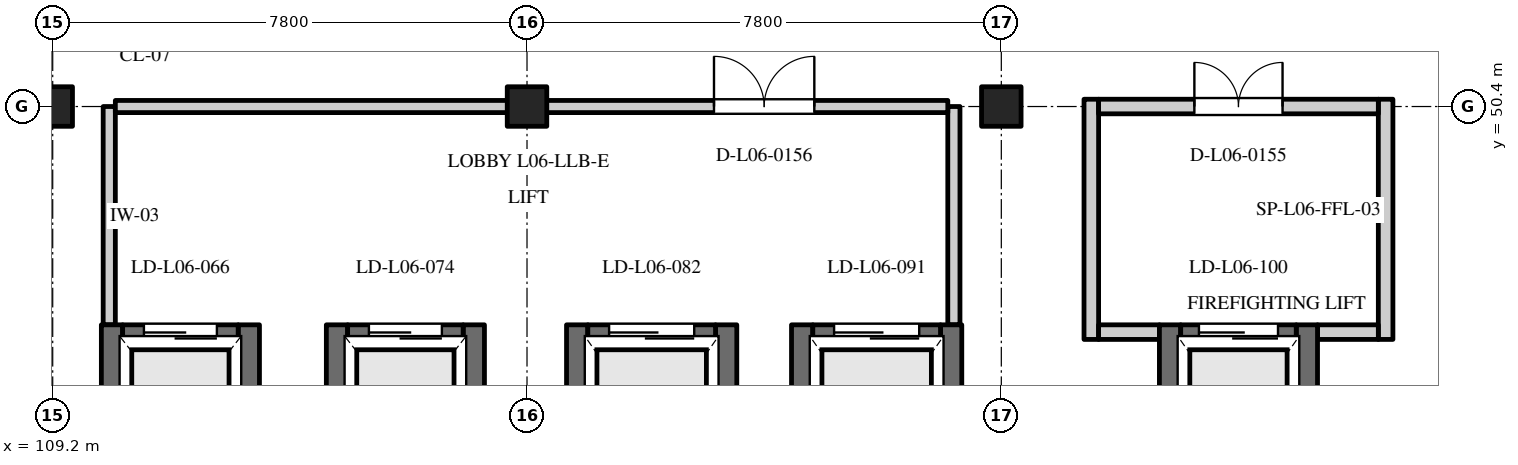
"""IFC4 building model, lengths in metres.
Left out: names, types, materials, properties, quantities, classifications, styles, units other than length and angle.
Written with IfcOpenShell. Run it as: python <this file> out.ifc"""

import sys

from ifc_helpers import new_model, si_unit, direction, frame, frame_2d, origin, origin_2d, place, context, subcontext, project, spatial, rectangle, extrude, element, fill, save


model = new_model("IFC4")
c1 = context("Model", 3, precision=1e-05, world=origin(), true_north=direction((0.0, 1.0)))
c2 = subcontext(c1, "Body", "Model", "MODEL_VIEW")
j1 = project(units=[si_unit("LENGTHUNIT", "METRE"), si_unit("PLANEANGLEUNIT", "RADIAN")], contexts=[c1])
p1 = place(None, origin())
s1 = spatial("IfcSite", under=j1, at=p1, CompositionType="ELEMENT")
p2 = place(p1, origin())
s2 = spatial("IfcBuilding", under=s1, at=p2, CompositionType="ELEMENT")
p3 = place(p2, frame((0.0, 0.0, 26.1)))
s3 = spatial("IfcBuildingStorey", under=s2, at=p3, CompositionType="ELEMENT", Elevation=26.1)
for number, where, z_axis, x_axis in (
    (1, (109.2, 50.4, 0.0), (0.0, 0.0, 1.0), (1.0, 0.0, 0.0)),
    (2, (117.0, 50.4, 0.0), (0.0, 0.0, 1.0), (1.0, 0.0, 0.0)),
    (3, (124.8, 50.4, 0.0), (0.0, 0.0, 1.0), (1.0, 0.0, 0.0)),
):
    element("IfcColumn", number, at=place(p3, frame(where, z_axis=z_axis, x_axis=x_axis)), inside=s3, PredefinedType="COLUMN", context=c2, shape_type="SweptSolid", body=[
        extrude(rectangle(XDim=0.65, YDim=0.65, at=origin_2d()), origin(), (0.0, 0.0, 1.0), 3.6),
    ])
for number, where, z_axis, x_axis in (
    (4, (110.175, 43.36, 0.0), (0.0, 0.0, 1.0), (0.0, 1.0, 0.0)),
    (5, (112.425, 43.36, 0.0), (0.0, 0.0, 1.0), (0.0, 1.0, 0.0)),
):
    element("IfcWall", number, at=place(p3, frame(where, z_axis=z_axis, x_axis=x_axis)), inside=s3, PredefinedType="SHEAR", context=c2, shape_type="SweptSolid", body=[
        extrude(rectangle(XDim=3.45, YDim=0.35, at=frame_2d((1.725, 0.0))), origin(), (0.0, 0.0, 1.0), 3.3),
    ])
p4 = place(p3, frame((110.35, 46.635, 0.0), z_axis=(0.0, 0.0, 1.0), x_axis=(1.0, 0.0, 0.0)))
e6 = element("IfcWall", 6, at=p4, inside=s3, PredefinedType="SHEAR", context=c2, shape_type="SweptSolid", body=[
    extrude(rectangle(XDim=1.9, YDim=0.35, at=frame_2d((0.95, 0.0))), origin(), (0.0, 0.0, 1.0), 3.3),
])
p5 = place(p4, frame((0.35, 0.0, 0.0)))
e7 = element("IfcOpeningElement", 7, at=p5, cuts=e6, PredefinedType="OPENING", context=c2, shape_type="SweptSolid", body=[
    extrude(rectangle(XDim=1.2, YDim=2.2, at=frame_2d((0.6, 1.1))), frame((0.0, 0.187, 0.0), z_axis=(0.0, -1.0, 0.0), x_axis=(1.0, 0.0, 0.0)), (0.0, 0.0, 1.0), 0.374),
])
for number, where, z_axis, x_axis in (
    (8, (113.875, 43.36, 0.0), (0.0, 0.0, 1.0), (0.0, 1.0, 0.0)),
    (9, (116.125, 43.36, 0.0), (0.0, 0.0, 1.0), (0.0, 1.0, 0.0)),
):
    element("IfcWall", number, at=place(p3, frame(where, z_axis=z_axis, x_axis=x_axis)), inside=s3, PredefinedType="SHEAR", context=c2, shape_type="SweptSolid", body=[
        extrude(rectangle(XDim=3.45, YDim=0.35, at=frame_2d((1.725, 0.0))), origin(), (0.0, 0.0, 1.0), 3.3),
    ])
p6 = place(p3, frame((114.05, 46.635, 0.0), z_axis=(0.0, 0.0, 1.0), x_axis=(1.0, 0.0, 0.0)))
e10 = element("IfcWall", 10, at=p6, inside=s3, PredefinedType="SHEAR", context=c2, shape_type="SweptSolid", body=[
    extrude(rectangle(XDim=1.9, YDim=0.35, at=frame_2d((0.95, 0.0))), origin(), (0.0, 0.0, 1.0), 3.3),
])
p7 = place(p6, frame((0.35, 0.0, 0.0)))
e11 = element("IfcOpeningElement", 11, at=p7, cuts=e10, PredefinedType="OPENING", context=c2, shape_type="SweptSolid", body=[
    extrude(rectangle(XDim=1.2, YDim=2.2, at=frame_2d((0.6, 1.1))), frame((0.0, 0.187, 0.0), z_axis=(0.0, -1.0, 0.0), x_axis=(1.0, 0.0, 0.0)), (0.0, 0.0, 1.0), 0.374),
])
for number, where, z_axis, x_axis in (
    (12, (117.825, 42.76, 0.0), (0.0, 0.0, 1.0), (0.0, 1.0, 0.0)),
    (13, (120.275, 42.76, 0.0), (0.0, 0.0, 1.0), (0.0, 1.0, 0.0)),
):
    element("IfcWall", number, at=place(p3, frame(where, z_axis=z_axis, x_axis=x_axis)), inside=s3, PredefinedType="SHEAR", context=c2, shape_type="SweptSolid", body=[
        extrude(rectangle(XDim=4.05, YDim=0.35, at=frame_2d((2.025, 0.0))), origin(), (0.0, 0.0, 1.0), 3.6),
    ])
p8 = place(p3, frame((118.0, 46.635, 0.0), z_axis=(0.0, 0.0, 1.0), x_axis=(1.0, 0.0, 0.0)))
e14 = element("IfcWall", 14, at=p8, inside=s3, PredefinedType="SHEAR", context=c2, shape_type="SweptSolid", body=[
    extrude(rectangle(XDim=2.1, YDim=0.35, at=frame_2d((1.05, 0.0))), origin(), (0.0, 0.0, 1.0), 3.3),
])
p9 = place(p8, frame((0.35, 0.0, 0.0)))
e15 = element("IfcOpeningElement", 15, at=p9, cuts=e14, PredefinedType="OPENING", context=c2, shape_type="SweptSolid", body=[
    extrude(rectangle(XDim=1.4, YDim=2.2, at=frame_2d((0.7, 1.1))), frame((0.0, 0.187, 0.0), z_axis=(0.0, -1.0, 0.0), x_axis=(1.0, 0.0, 0.0)), (0.0, 0.0, 1.0), 0.374),
])
for number, where, z_axis, x_axis in (
    (16, (121.525, 42.76, 0.0), (0.0, 0.0, 1.0), (0.0, 1.0, 0.0)),
    (17, (123.975, 42.76, 0.0), (0.0, 0.0, 1.0), (0.0, 1.0, 0.0)),
):
    element("IfcWall", number, at=place(p3, frame(where, z_axis=z_axis, x_axis=x_axis)), inside=s3, PredefinedType="SHEAR", context=c2, shape_type="SweptSolid", body=[
        extrude(rectangle(XDim=4.05, YDim=0.35, at=frame_2d((2.025, 0.0))), origin(), (0.0, 0.0, 1.0), 3.6),
    ])
p10 = place(p3, frame((121.7, 46.635, 0.0), z_axis=(0.0, 0.0, 1.0), x_axis=(1.0, 0.0, 0.0)))
e18 = element("IfcWall", 18, at=p10, inside=s3, PredefinedType="SHEAR", context=c2, shape_type="SweptSolid", body=[
    extrude(rectangle(XDim=2.1, YDim=0.35, at=frame_2d((1.05, 0.0))), origin(), (0.0, 0.0, 1.0), 3.3),
])
p11 = place(p10, frame((0.35, 0.0, 0.0)))
e19 = element("IfcOpeningElement", 19, at=p11, cuts=e18, PredefinedType="OPENING", context=c2, shape_type="SweptSolid", body=[
    extrude(rectangle(XDim=1.4, YDim=2.2, at=frame_2d((0.7, 1.1))), frame((0.0, 0.187, 0.0), z_axis=(0.0, -1.0, 0.0), x_axis=(1.0, 0.0, 0.0)), (0.0, 0.0, 1.0), 0.374),
])
for number, where, z_axis, x_axis in (
    (20, (127.575, 43.06, 0.0), (0.0, 0.0, 1.0), (0.0, 1.0, 0.0)),
    (21, (129.825, 43.06, 0.0), (0.0, 0.0, 1.0), (0.0, 1.0, 0.0)),
):
    element("IfcWall", number, at=place(p3, frame(where, z_axis=z_axis, x_axis=x_axis)), inside=s3, PredefinedType="SHEAR", context=c2, shape_type="SweptSolid", body=[
        extrude(rectangle(XDim=3.75, YDim=0.35, at=frame_2d((1.875, 0.0))), origin(), (0.0, 0.0, 1.0), 3.6),
    ])
p12 = place(p3, frame((127.75, 46.635, 0.0), z_axis=(0.0, 0.0, 1.0), x_axis=(1.0, 0.0, 0.0)))
e22 = element("IfcWall", 22, at=p12, inside=s3, PredefinedType="SHEAR", context=c2, shape_type="SweptSolid", body=[
    extrude(rectangle(XDim=1.9, YDim=0.35, at=frame_2d((0.95, 0.0))), origin(), (0.0, 0.0, 1.0), 3.3),
])
p13 = place(p12, frame((0.3, 0.0, 0.0)))
e23 = element("IfcOpeningElement", 23, at=p13, cuts=e22, PredefinedType="OPENING", context=c2, shape_type="SweptSolid", body=[
    extrude(rectangle(XDim=1.3, YDim=2.2, at=frame_2d((0.65, 1.1))), frame((0.0, 0.187, 0.0), z_axis=(0.0, -1.0, 0.0), x_axis=(1.0, 0.0, 0.0)), (0.0, 0.0, 1.0), 0.374),
])
for number, where, z_axis, x_axis in (
    (24, (126.28, 46.57, 0.0), (0.0, 0.0, 1.0), (0.0, 1.0, 0.0)),
    (25, (131.12, 46.57, 0.0), (0.0, 0.0, 1.0), (0.0, 1.0, 0.0)),
):
    element("IfcWall", number, at=place(p3, frame(where, z_axis=z_axis, x_axis=x_axis)), inside=s3, PredefinedType="STANDARD", context=c2, shape_type="SweptSolid", body=[
        extrude(rectangle(XDim=3.95, YDim=0.24, at=frame_2d((1.975, 0.0))), origin(), (0.0, 0.0, 1.0), 2.8),
    ])
for number, where, z_axis, x_axis in (
    (26, (126.4, 46.69, 0.0), (0.0, 0.0, 1.0), (1.0, 0.0, 0.0)),
    (27, (130.0, 46.69, 0.0), (0.0, 0.0, 1.0), (1.0, 0.0, 0.0)),
):
    element("IfcWall", number, at=place(p3, frame(where, z_axis=z_axis, x_axis=x_axis)), inside=s3, PredefinedType="STANDARD", context=c2, shape_type="SweptSolid", body=[
        extrude(rectangle(XDim=1.0, YDim=0.24, at=frame_2d((0.5, 0.0))), origin(), (0.0, 0.0, 1.0), 2.8),
    ])
p14 = place(p3, frame((126.4, 50.4, 0.0), z_axis=(0.0, 0.0, 1.0), x_axis=(1.0, 0.0, 0.0)))
e28 = element("IfcWall", 28, at=p14, inside=s3, PredefinedType="STANDARD", context=c2, shape_type="SweptSolid", body=[
    extrude(rectangle(XDim=4.6, YDim=0.24, at=frame_2d((2.3, 0.0))), origin(), (0.0, 0.0, 1.0), 2.8),
])
p15 = place(p14, frame((1.575, 0.0, 0.0)))
e29 = element("IfcOpeningElement", 29, at=p15, cuts=e28, PredefinedType="OPENING", context=c2, shape_type="SweptSolid", body=[
    extrude(rectangle(XDim=1.45, YDim=2.2, at=frame_2d((0.725, 1.1))), frame((0.0, 0.132, 0.0), z_axis=(0.0, -1.0, 0.0), x_axis=(1.0, 0.0, 0.0)), (0.0, 0.0, 1.0), 0.264),
])
for number, where, z_axis, x_axis in (
    (30, (110.13, 46.81, 0.0), (0.0, 0.0, 1.0), (0.0, 1.0, 0.0)),
    (31, (124.02, 46.81, 0.0), (0.0, 0.0, 1.0), (0.0, 1.0, 0.0)),
):
    element("IfcWall", number, at=place(p3, frame(where, z_axis=z_axis, x_axis=x_axis)), inside=s3, PredefinedType="STANDARD", context=c2, shape_type="SweptSolid", body=[
        extrude(rectangle(XDim=3.59, YDim=0.2, at=frame_2d((1.795, 0.0))), origin(), (0.0, 0.0, 1.0), 2.8),
    ])
p16 = place(p3, frame((110.23, 50.4, 0.0), z_axis=(0.0, 0.0, 1.0), x_axis=(1.0, 0.0, 0.0)))
e32 = element("IfcWall", 32, at=p16, inside=s3, PredefinedType="STANDARD", context=c2, shape_type="SweptSolid", body=[
    extrude(rectangle(XDim=13.69, YDim=0.2, at=frame_2d((6.845, 0.0))), origin(), (0.0, 0.0, 1.0), 2.8),
])
p17 = place(p16, frame((9.845, 0.0, 0.0)))
e33 = element("IfcOpeningElement", 33, at=p17, cuts=e32, PredefinedType="OPENING", context=c2, shape_type="SweptSolid", body=[
    extrude(rectangle(XDim=1.65, YDim=2.25, at=frame_2d((0.825, 1.125))), frame((0.0, 0.112, 0.0), z_axis=(0.0, -1.0, 0.0), x_axis=(1.0, 0.0, 0.0)), (0.0, 0.0, 1.0), 0.224),
])
p18 = place(p5, origin())
e34 = element("IfcDoor", 34, at=p18, inside=s3, OperationType="SLIDING_TO_LEFT", PredefinedType="DOOR", context=c2, shape_type="SweptSolid", body=[
    extrude(rectangle(XDim=1.2, YDim=2.2, at=frame_2d((0.6, 1.1))), frame((0.0, 0.025, 0.0), z_axis=(0.0, -1.0, 0.0), x_axis=(1.0, 0.0, 0.0)), (0.0, 0.0, 1.0), 0.05),
])
fill(e7, e34)
p19 = place(p7, origin())
e35 = element("IfcDoor", 35, at=p19, inside=s3, OperationType="SLIDING_TO_LEFT", PredefinedType="DOOR", context=c2, shape_type="SweptSolid", body=[
    extrude(rectangle(XDim=1.2, YDim=2.2, at=frame_2d((0.6, 1.1))), frame((0.0, 0.025, 0.0), z_axis=(0.0, -1.0, 0.0), x_axis=(1.0, 0.0, 0.0)), (0.0, 0.0, 1.0), 0.05),
])
fill(e11, e35)
p20 = place(p9, origin())
e36 = element("IfcDoor", 36, at=p20, inside=s3, OperationType="SLIDING_TO_LEFT", PredefinedType="DOOR", context=c2, shape_type="SweptSolid", body=[
    extrude(rectangle(XDim=1.4, YDim=2.2, at=frame_2d((0.7, 1.1))), frame((0.0, 0.025, 0.0), z_axis=(0.0, -1.0, 0.0), x_axis=(1.0, 0.0, 0.0)), (0.0, 0.0, 1.0), 0.05),
])
fill(e15, e36)
p21 = place(p11, origin())
e37 = element("IfcDoor", 37, at=p21, inside=s3, OperationType="SLIDING_TO_LEFT", PredefinedType="DOOR", context=c2, shape_type="SweptSolid", body=[
    extrude(rectangle(XDim=1.4, YDim=2.2, at=frame_2d((0.7, 1.1))), frame((0.0, 0.025, 0.0), z_axis=(0.0, -1.0, 0.0), x_axis=(1.0, 0.0, 0.0)), (0.0, 0.0, 1.0), 0.05),
])
fill(e19, e37)
p22 = place(p13, origin())
e38 = element("IfcDoor", 38, at=p22, inside=s3, OperationType="SLIDING_TO_LEFT", PredefinedType="DOOR", context=c2, shape_type="SweptSolid", body=[
    extrude(rectangle(XDim=1.3, YDim=2.2, at=frame_2d((0.65, 1.1))), frame((0.0, 0.025, 0.0), z_axis=(0.0, -1.0, 0.0), x_axis=(1.0, 0.0, 0.0)), (0.0, 0.0, 1.0), 0.05),
])
fill(e23, e38)
p23 = place(p15, origin())
e39 = element("IfcDoor", 39, at=p23, inside=s3, OperationType="DOUBLE_DOOR_SINGLE_SWING", PredefinedType="DOOR", context=c2, shape_type="SweptSolid", body=[
    extrude(rectangle(XDim=1.45, YDim=2.2, at=frame_2d((0.725, 1.1))), frame((0.0, 0.025, 0.0), z_axis=(0.0, -1.0, 0.0), x_axis=(1.0, 0.0, 0.0)), (0.0, 0.0, 1.0), 0.05),
])
fill(e29, e39)
p24 = place(p17, origin())
e40 = element("IfcDoor", 40, at=p24, inside=s3, OperationType="DOUBLE_DOOR_SINGLE_SWING", PredefinedType="DOOR", context=c2, shape_type="SweptSolid", body=[
    extrude(rectangle(XDim=1.65, YDim=2.25, at=frame_2d((0.825, 1.125))), frame((0.0, 0.025, 0.0), z_axis=(0.0, -1.0, 0.0), x_axis=(1.0, 0.0, 0.0)), (0.0, 0.0, 1.0), 0.05),
])
fill(e33, e40)
save(model, sys.argv[1])
